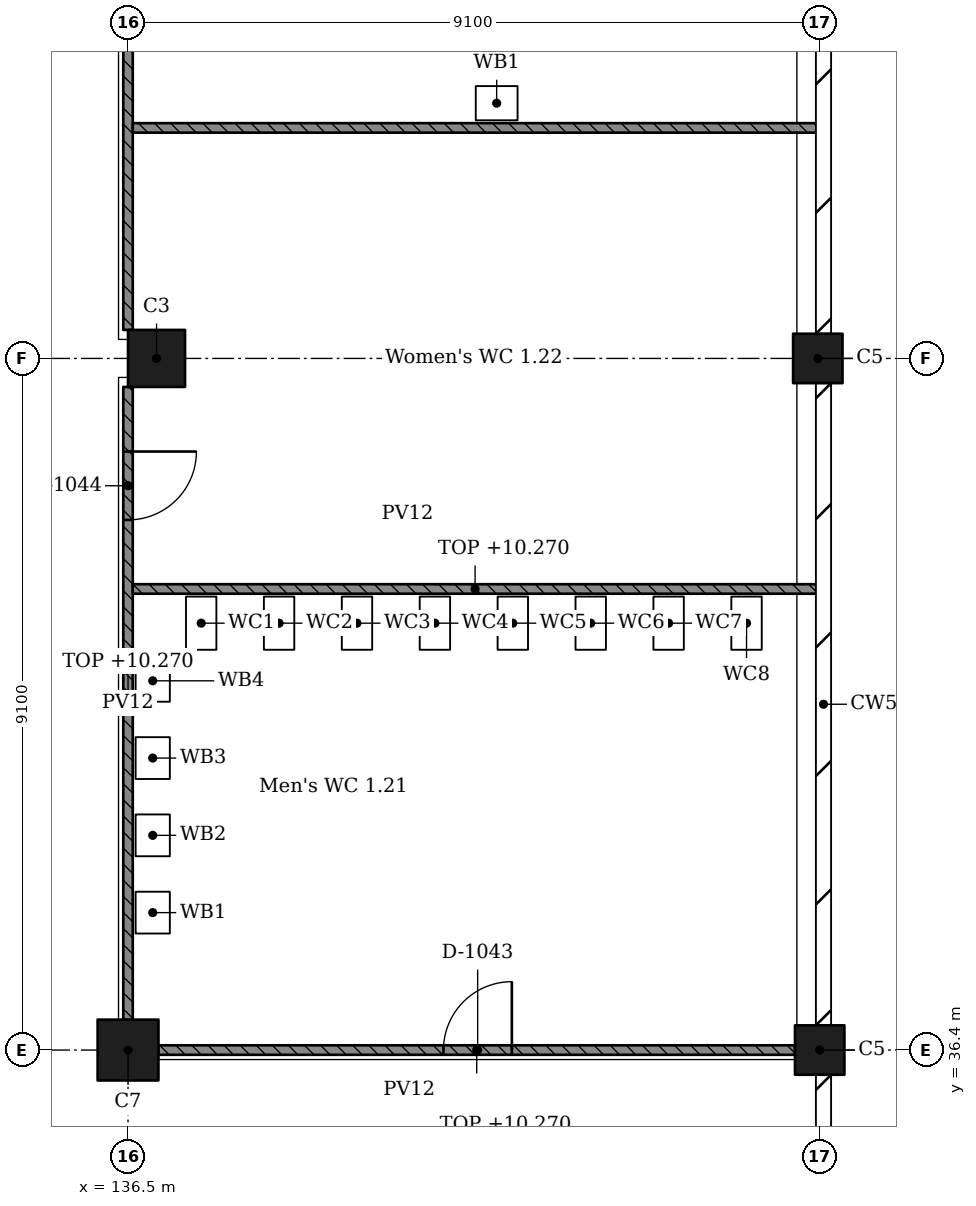
"""IFC4 building model, lengths in metres.
Left out: names, types, materials, properties, quantities, classifications, styles, units other than length and angle.
Written with IfcOpenShell. Run it as: python <this file> out.ifc"""

import sys

from ifc_helpers import new_model, si_unit, direction, frame, frame_2d, origin, origin_2d, place, context, subcontext, project, spatial, rectangle, extrude, element, fill, save


model = new_model("IFC4")
c1 = context("Model", 3, precision=1e-05, world=origin(), true_north=direction((0.0, 1.0)))
c2 = subcontext(c1, "Body", "Model", "MODEL_VIEW")
j1 = project(units=[si_unit("LENGTHUNIT", "METRE"), si_unit("PLANEANGLEUNIT", "RADIAN")], contexts=[c1])
p1 = place(None, origin())
s1 = spatial("IfcSite", under=j1, at=p1, CompositionType="ELEMENT")
p2 = place(p1, origin())
s2 = spatial("IfcBuilding", under=s1, at=p2, CompositionType="ELEMENT")
p3 = place(p2, frame((0.0, 0.0, 6.37)))
s3 = spatial("IfcBuildingStorey", under=s2, at=p3, CompositionType="ELEMENT", Elevation=6.37)
p4 = place(p3, frame((136.5, 36.4, 0.0), z_axis=(0.0, 0.0, 1.0), x_axis=(1.0, 0.0, 0.0)))
e1 = element("IfcColumn", 1, at=p4, inside=s3, PredefinedType="COLUMN", context=c2, shape_type="SweptSolid", body=[
    extrude(rectangle(XDim=0.8, YDim=0.8, at=origin_2d()), origin(), (0.0, 0.0, 1.0), 4.55),
])
p5 = place(p3, frame((136.875, 45.5, 0.0), z_axis=(0.0, 0.0, 1.0), x_axis=(1.0, 0.0, 0.0)))
e2 = element("IfcColumn", 2, at=p5, inside=s3, PredefinedType="COLUMN", context=c2, shape_type="SweptSolid", body=[
    extrude(rectangle(XDim=0.75, YDim=0.75, at=origin_2d()), origin(), (0.0, 0.0, 1.0), 4.55),
])
for number, where, z_axis, x_axis in (
    (3, (145.6, 36.4, 0.0), (0.0, 0.0, 1.0), (1.0, 0.0, 0.0)),
    (4, (145.575, 45.5, 0.0), (0.0, 0.0, 1.0), (1.0, 0.0, 0.0)),
):
    element("IfcColumn", number, at=place(p3, frame(where, z_axis=z_axis, x_axis=x_axis)), inside=s3, PredefinedType="COLUMN", context=c2, shape_type="SweptSolid", body=[
        extrude(rectangle(XDim=0.65, YDim=0.65, at=origin_2d()), origin(), (0.0, 0.0, 1.0), 4.55),
    ])
p6 = place(p3, frame((136.5, 36.8, 0.0), z_axis=(0.0, 0.0, 1.0), x_axis=(0.0, 1.0, 0.0)))
e5 = element("IfcWall", 5, at=p6, inside=s3, PredefinedType="PARTITIONING", context=c2, shape_type="SweptSolid", body=[
    extrude(rectangle(XDim=8.325, YDim=0.125, at=frame_2d((4.163, 0.0))), origin(), (0.0, 0.0, 1.0), 3.9),
])
p7 = place(p6, frame((6.575, 0.0, 0.0)))
e6 = element("IfcOpeningElement", 6, at=p7, cuts=e5, PredefinedType="OPENING", context=c2, shape_type="SweptSolid", body=[
    extrude(rectangle(XDim=0.9, YDim=2.1, at=frame_2d((0.45, 1.05))), frame((0.0, 0.073, 0.0), z_axis=(0.0, -1.0, 0.0), x_axis=(1.0, 0.0, 0.0)), (0.0, 0.0, 1.0), 0.145),
])
p8 = place(p3, frame((136.5, 45.875, 0.0), z_axis=(0.0, 0.0, 1.0), x_axis=(0.0, 1.0, 0.0)))
e7 = element("IfcWall", 7, at=p8, inside=s3, PredefinedType="PARTITIONING", context=c2, shape_type="SweptSolid", body=[
    extrude(rectangle(XDim=8.35, YDim=0.125, at=frame_2d((4.175, 0.0))), origin(), (0.0, 0.0, 1.0), 3.9),
])
p9 = place(p8, frame((5.0, 0.0, 0.0)))
e8 = element("IfcOpeningElement", 8, at=p9, cuts=e7, PredefinedType="OPENING", context=c2, shape_type="SweptSolid", body=[
    extrude(rectangle(XDim=1.0, YDim=2.1, at=frame_2d((0.5, 1.05))), frame((0.0, 0.073, 0.0), z_axis=(0.0, -1.0, 0.0), x_axis=(1.0, 0.0, 0.0)), (0.0, 0.0, 1.0), 0.145),
])
for number, where, z_axis, x_axis in (
    (9, (136.562, 42.467, 0.0), (0.0, 0.0, 1.0), (1.0, 0.0, 0.0)),
    (10, (136.562, 48.533, 0.0), (0.0, 0.0, 1.0), (1.0, 0.0, 0.0)),
):
    element("IfcWall", number, at=place(p3, frame(where, z_axis=z_axis, x_axis=x_axis)), inside=s3, PredefinedType="PARTITIONING", context=c2, shape_type="SweptSolid", body=[
        extrude(rectangle(XDim=9.008, YDim=0.125, at=frame_2d((4.504, 0.0))), origin(), (0.0, 0.0, 1.0), 3.9),
    ])
p10 = place(p3, frame((136.9, 36.4, 0.0), z_axis=(0.0, 0.0, 1.0), x_axis=(1.0, 0.0, 0.0)))
e11 = element("IfcWall", 11, at=p10, inside=s3, PredefinedType="PARTITIONING", context=c2, shape_type="SweptSolid", body=[
    extrude(rectangle(XDim=8.375, YDim=0.125, at=frame_2d((4.188, 0.0))), origin(), (0.0, 0.0, 1.0), 3.9),
])
p11 = place(p10, frame((3.75, 0.0, 0.0)))
e12 = element("IfcOpeningElement", 12, at=p11, cuts=e11, PredefinedType="OPENING", context=c2, shape_type="SweptSolid", body=[
    extrude(rectangle(XDim=0.9, YDim=2.1, at=frame_2d((0.45, 1.05))), frame((0.0, 0.073, 0.0), z_axis=(0.0, -1.0, 0.0), x_axis=(1.0, 0.0, 0.0)), (0.0, 0.0, 1.0), 0.145),
])
p12 = place(p11, origin())
e13 = element("IfcDoor", 13, at=p12, inside=s3, OperationType="SINGLE_SWING_LEFT", PredefinedType="DOOR", context=c2, shape_type="SweptSolid", body=[
    extrude(rectangle(XDim=0.9, YDim=2.1, at=frame_2d((0.45, 1.05))), frame((0.0, 0.025, 0.0), z_axis=(0.0, -1.0, 0.0), x_axis=(1.0, 0.0, 0.0)), (0.0, 0.0, 1.0), 0.05),
])
fill(e12, e13)
p13 = place(p7, origin())
e14 = element("IfcDoor", 14, at=p13, inside=s3, OperationType="SINGLE_SWING_RIGHT", PredefinedType="DOOR", context=c2, shape_type="SweptSolid", body=[
    extrude(rectangle(XDim=0.9, YDim=2.1, at=frame_2d((0.45, 1.05))), frame((0.0, 0.025, 0.0), z_axis=(0.0, -1.0, 0.0), x_axis=(1.0, 0.0, 0.0)), (0.0, 0.0, 1.0), 0.05),
])
fill(e6, e14)
save(model, sys.argv[1])
